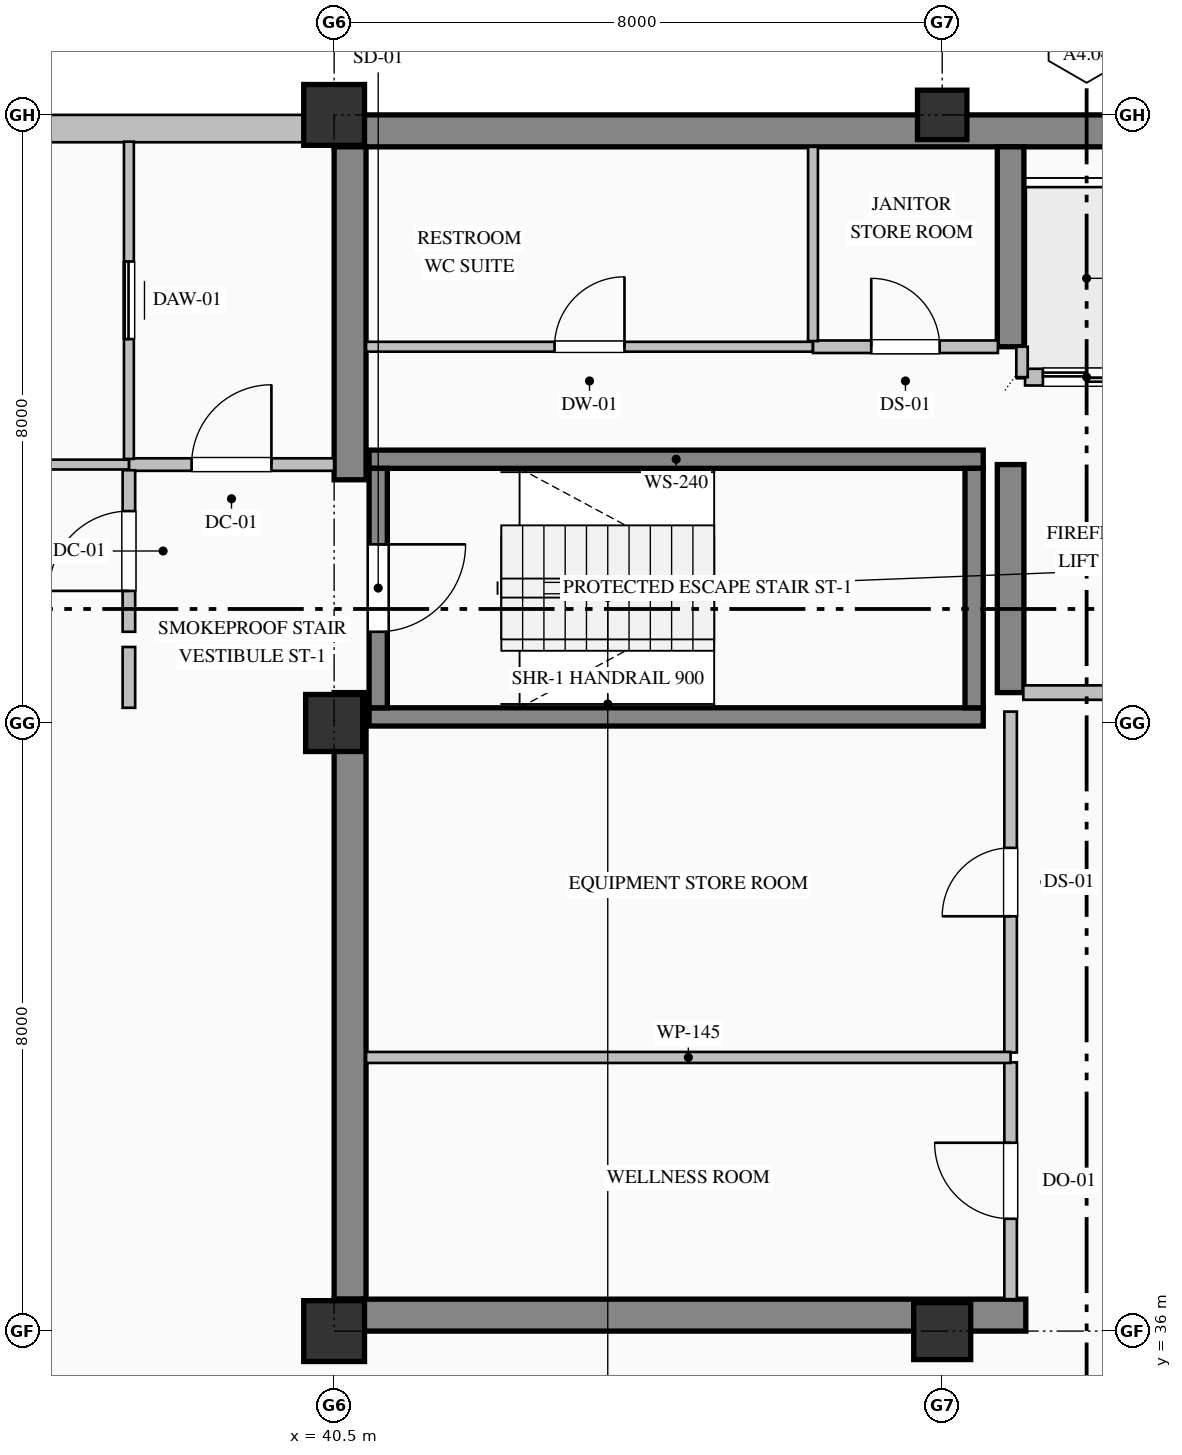
"""IFC4 building model, lengths in metres.
Left out: names, types, materials, properties, quantities, classifications, styles, units other than length and angle.
Written with IfcOpenShell. Run it as: python <this file> out.ifc"""

import sys

from ifc_helpers import new_model, si_unit, direction, frame, frame_2d, origin, origin_2d, place, context, subcontext, project, spatial, rectangle, hollow_rectangle, extrude, element, fill, save


model = new_model("IFC4")
c1 = context("Model", 3, precision=1e-05, world=origin(), true_north=direction((0.0, 1.0)))
c2 = subcontext(c1, "Body", "Model", "MODEL_VIEW")
j1 = project(units=[si_unit("LENGTHUNIT", "METRE"), si_unit("PLANEANGLEUNIT", "RADIAN")], contexts=[c1])
p1 = place(None, origin())
s1 = spatial("IfcSite", under=j1, at=p1, CompositionType="ELEMENT")
p2 = place(p1, origin())
s2 = spatial("IfcBuilding", under=s1, at=p2, CompositionType="ELEMENT")
p3 = place(p2, frame((0.0, 0.0, 307.2)))
s3 = spatial("IfcBuildingStorey", under=s2, at=p3, CompositionType="ELEMENT", Elevation=307.2)
p4 = place(p3, frame((40.5, 51.79, 0.0), z_axis=(0.0, 0.0, 1.0), x_axis=(1.0, 0.0, 0.0)))
e1 = element("IfcWall", 1, at=p4, inside=s3, PredefinedType="SHEAR", context=c2, shape_type="SweptSolid", body=[
    extrude(rectangle(XDim=23.5, YDim=0.42, at=frame_2d((11.75, 0.0))), origin(), (0.0, 0.0, 1.0), 3.785),
])
p5 = place(p3, frame((40.71, 36.42, 0.0), z_axis=(0.0, 0.0, 1.0), x_axis=(0.0, 1.0, 0.0)))
e2 = element("IfcWall", 2, at=p5, inside=s3, PredefinedType="SHEAR", context=c2, shape_type="SweptSolid", body=[
    extrude(rectangle(XDim=7.98, YDim=0.42, at=frame_2d((3.99, 0.0))), origin(), (0.0, 0.0, 1.0), 3.785),
])
p6 = place(p3, frame((40.71, 47.2, 0.0), z_axis=(0.0, 0.0, 1.0), x_axis=(0.0, 1.0, 0.0)))
e3 = element("IfcWall", 3, at=p6, inside=s3, PredefinedType="SHEAR", context=c2, shape_type="SweptSolid", body=[
    extrude(rectangle(XDim=4.38, YDim=0.42, at=frame_2d((2.19, 0.0))), origin(), (0.0, 0.0, 1.0), 3.785),
])
p7 = place(p3, frame((40.5, 36.21, 0.0), z_axis=(0.0, 0.0, 1.0), x_axis=(1.0, 0.0, 0.0)))
e4 = element("IfcWall", 4, at=p7, inside=s3, PredefinedType="SHEAR", context=c2, shape_type="SweptSolid", body=[
    extrude(rectangle(XDim=9.1, YDim=0.42, at=frame_2d((4.55, 0.0))), origin(), (0.0, 0.0, 1.0), 3.785),
])
p8 = place(p3, frame((49.4, 44.4, 0.0), z_axis=(0.0, 0.0, 1.0), x_axis=(0.0, 1.0, 0.0)))
e5 = element("IfcWall", 5, at=p8, inside=s3, PredefinedType="SHEAR", context=c2, shape_type="SweptSolid", body=[
    extrude(rectangle(XDim=3.0, YDim=0.35, at=frame_2d((1.5, 0.0))), origin(), (0.0, 0.0, 1.0), 3.785),
])
p9 = place(p3, frame((49.4, 48.95, 0.0), z_axis=(0.0, 0.0, 1.0), x_axis=(0.0, 1.0, 0.0)))
e6 = element("IfcWall", 6, at=p9, inside=s3, PredefinedType="SHEAR", context=c2, shape_type="SweptSolid", body=[
    extrude(rectangle(XDim=2.63, YDim=0.35, at=frame_2d((1.315, 0.0))), origin(), (0.0, 0.0, 1.0), 3.785),
])
p10 = place(p3, frame((40.5, 36.0, 0.0), z_axis=(0.0, 0.0, 1.0), x_axis=(1.0, 0.0, 0.0)))
e7 = element("IfcColumn", 7, at=p10, inside=s3, PredefinedType="COLUMN", context=c2, shape_type="SweptSolid", body=[
    extrude(hollow_rectangle(XDim=0.8, YDim=0.8, WallThickness=0.032, at=origin_2d()), origin(), (0.0, 0.0, 1.0), 4.0),
])
p11 = place(p3, frame((40.5, 44.0, 0.0), z_axis=(0.0, 0.0, 1.0), x_axis=(1.0, 0.0, 0.0)))
e8 = element("IfcColumn", 8, at=p11, inside=s3, PredefinedType="COLUMN", context=c2, shape_type="SweptSolid", body=[
    extrude(rectangle(XDim=0.75, YDim=0.75, at=origin_2d()), origin(), (0.0, 0.0, 1.0), 4.0),
])
p12 = place(p3, frame((40.5, 52.0, 0.0), z_axis=(0.0, 0.0, 1.0), x_axis=(1.0, 0.0, 0.0)))
e9 = element("IfcColumn", 9, at=p12, inside=s3, PredefinedType="COLUMN", context=c2, shape_type="SweptSolid", body=[
    extrude(hollow_rectangle(XDim=0.8, YDim=0.8, WallThickness=0.032, at=origin_2d()), origin(), (0.0, 0.0, 1.0), 4.0),
])
p13 = place(p3, frame((48.5, 36.0, 0.0), z_axis=(0.0, 0.0, 1.0), x_axis=(1.0, 0.0, 0.0)))
e10 = element("IfcColumn", 10, at=p13, inside=s3, PredefinedType="COLUMN", context=c2, shape_type="SweptSolid", body=[
    extrude(rectangle(XDim=0.75, YDim=0.75, at=origin_2d()), origin(), (0.0, 0.0, 1.0), 4.0),
])
p14 = place(p3, frame((48.5, 52.0, 0.0), z_axis=(0.0, 0.0, 1.0), x_axis=(1.0, 0.0, 0.0)))
e11 = element("IfcColumn", 11, at=p14, inside=s3, PredefinedType="COLUMN", context=c2, shape_type="SweptSolid", body=[
    extrude(hollow_rectangle(XDim=0.65, YDim=0.65, WallThickness=0.028, at=origin_2d()), origin(), (0.0, 0.0, 1.0), 4.0),
])
p15 = place(p3, frame((20.5, 51.82, 0.0), z_axis=(0.0, 0.0, 1.0), x_axis=(1.0, 0.0, 0.0)))
e12 = element("IfcWall", 12, at=p15, inside=s3, PredefinedType="SOLIDWALL", context=c2, shape_type="SweptSolid", body=[
    extrude(rectangle(XDim=20.02, YDim=0.36, at=frame_2d((10.01, 0.0))), origin(), (0.0, 0.0, 1.0), 3.335),
])
p16 = place(p15, frame((6.525, 0.0, 0.9)))
e13 = element("IfcOpeningElement", 13, at=p16, cuts=e12, PredefinedType="OPENING", context=c2, shape_type="SweptSolid", body=[
    extrude(rectangle(XDim=1.35, YDim=1.85, at=frame_2d((0.675, 0.925))), frame((0.0, 0.19, 0.0), z_axis=(0.0, -1.0, 0.0), x_axis=(1.0, 0.0, 0.0)), (0.0, 0.0, 1.0), 0.38),
])
for number, where, z_axis, x_axis in (
    (14, (40.96, 47.47, 0.0), (0.0, 0.0, 1.0), (1.0, 0.0, 0.0)),
    (15, (49.04, 44.08, 0.0), (0.0, 0.0, 1.0), (-1.0, 0.0, 0.0)),
):
    element("IfcWall", number, at=place(p3, frame(where, z_axis=z_axis, x_axis=x_axis)), inside=s3, PredefinedType="SOLIDWALL", context=c2, shape_type="SweptSolid", body=[
        extrude(rectangle(XDim=8.08, YDim=0.24, at=frame_2d((4.04, 0.0))), origin(), (0.0, 0.0, 1.0), 4.0),
    ])
p17 = place(p3, frame((41.08, 47.35, 0.0), z_axis=(0.0, 0.0, 1.0), x_axis=(0.0, -1.0, 0.0)))
e16 = element("IfcWall", 16, at=p17, inside=s3, PredefinedType="SOLIDWALL", context=c2, shape_type="SweptSolid", body=[
    extrude(rectangle(XDim=3.15, YDim=0.24, at=frame_2d((1.575, 0.0))), origin(), (0.0, 0.0, 1.0), 4.0),
])
p18 = place(p17, frame((1.0, 0.0, 0.0)))
e17 = element("IfcOpeningElement", 17, at=p18, cuts=e16, PredefinedType="OPENING", context=c2, shape_type="SweptSolid", body=[
    extrude(rectangle(XDim=1.15, YDim=2.2, at=frame_2d((0.575, 1.1))), frame((0.0, 0.13, 0.0), z_axis=(0.0, -1.0, 0.0), x_axis=(1.0, 0.0, 0.0)), (0.0, 0.0, 1.0), 0.26),
])
p19 = place(p3, frame((48.92, 44.2, 0.0), z_axis=(0.0, 0.0, 1.0), x_axis=(0.0, 1.0, 0.0)))
e18 = element("IfcWall", 18, at=p19, inside=s3, PredefinedType="SOLIDWALL", context=c2, shape_type="SweptSolid", body=[
    extrude(rectangle(XDim=3.15, YDim=0.24, at=frame_2d((1.575, 0.0))), origin(), (0.0, 0.0, 1.0), 4.0),
])
p20 = place(p3, frame((54.71, 48.55, 0.0), z_axis=(0.0, 0.0, 1.0), x_axis=(-1.0, 0.0, 0.0)))
e19 = element("IfcWall", 19, at=p20, inside=s3, PredefinedType="PARTITIONING", context=c2, shape_type="SweptSolid", body=[
    extrude(rectangle(XDim=5.12, YDim=0.22, at=frame_2d((2.56, 0.0))), origin(), (0.0, 0.0, 1.0), 3.785),
])
p21 = place(p20, frame((3.735, 0.0, 0.0)))
e20 = element("IfcOpeningElement", 20, at=p21, cuts=e19, PredefinedType="OPENING", context=c2, shape_type="SweptSolid", body=[
    extrude(rectangle(XDim=1.15, YDim=2.2, at=frame_2d((0.575, 1.1))), frame((0.0, 0.12, 0.0), z_axis=(0.0, -1.0, 0.0), x_axis=(1.0, 0.0, 0.0)), (0.0, 0.0, 1.0), 0.24),
])
p22 = place(p20, frame((0.935, 0.0, 0.0)))
e21 = element("IfcOpeningElement", 21, at=p22, cuts=e19, PredefinedType="OPENING", context=c2, shape_type="SweptSolid", body=[
    extrude(rectangle(XDim=1.15, YDim=2.2, at=frame_2d((0.575, 1.1))), frame((0.0, 0.12, 0.0), z_axis=(0.0, -1.0, 0.0), x_axis=(1.0, 0.0, 0.0)), (0.0, 0.0, 1.0), 0.24),
])
p23 = place(p3, frame((49.55, 48.55, 0.0), z_axis=(0.0, 0.0, 1.0), x_axis=(0.0, 1.0, 0.0)))
e22 = element("IfcWall", 22, at=p23, inside=s3, PredefinedType="PARTITIONING", context=c2, shape_type="SweptSolid", body=[
    extrude(rectangle(XDim=0.4, YDim=0.15, at=frame_2d((0.2, 0.0))), origin(), (0.0, 0.0, 1.0), 3.785),
])
p24 = place(p3, frame((37.8, 47.4, 0.0), z_axis=(0.0, 0.0, 1.0), x_axis=(1.0, 0.0, 0.0)))
e23 = element("IfcWall", 23, at=p24, inside=s3, PredefinedType="PARTITIONING", context=c2, shape_type="SweptSolid", body=[
    extrude(rectangle(XDim=2.7, YDim=0.165, at=frame_2d((1.35, 0.0))), origin(), (0.0, 0.0, 1.0), 3.785),
])
p25 = place(p24, frame((0.825, 0.0, 0.0)))
e24 = element("IfcOpeningElement", 24, at=p25, cuts=e23, PredefinedType="OPENING", context=c2, shape_type="SweptSolid", body=[
    extrude(rectangle(XDim=1.05, YDim=2.15, at=frame_2d((0.525, 1.075))), frame((0.0, 0.093, 0.0), z_axis=(0.0, -1.0, 0.0), x_axis=(1.0, 0.0, 0.0)), (0.0, 0.0, 1.0), 0.185),
])
p26 = place(p3, frame((37.8, 45.2, 0.0), z_axis=(0.0, 0.0, 1.0), x_axis=(0.0, 1.0, 0.0)))
e25 = element("IfcWall", 25, at=p26, inside=s3, PredefinedType="PARTITIONING", context=c2, shape_type="SweptSolid", body=[
    extrude(rectangle(XDim=2.125, YDim=0.165, at=frame_2d((1.063, 0.0))), origin(), (0.0, 0.0, 1.0), 3.785),
])
p27 = place(p26, frame((0.538, 0.0, 0.0)))
e26 = element("IfcOpeningElement", 26, at=p27, cuts=e25, PredefinedType="OPENING", context=c2, shape_type="SweptSolid", body=[
    extrude(rectangle(XDim=1.05, YDim=2.15, at=frame_2d((0.525, 1.075))), frame((0.0, 0.093, 0.0), z_axis=(0.0, -1.0, 0.0), x_axis=(1.0, 0.0, 0.0)), (0.0, 0.0, 1.0), 0.185),
])
p28 = place(p3, frame((37.8, 44.2, 0.0), z_axis=(0.0, 0.0, 1.0), x_axis=(0.0, 1.0, 0.0)))
e27 = element("IfcWall", 27, at=p28, inside=s3, PredefinedType="PARTITIONING", context=c2, shape_type="SweptSolid", body=[
    extrude(rectangle(XDim=0.8, YDim=0.165, at=frame_2d((0.4, 0.0))), origin(), (0.0, 0.0, 1.0), 3.785),
])
p29 = place(p3, frame((37.8, 47.475, 0.0), z_axis=(0.0, 0.0, 1.0), x_axis=(0.0, 1.0, 0.0)))
e28 = element("IfcWall", 28, at=p29, inside=s3, PredefinedType="PARTITIONING", context=c2, shape_type="SweptSolid", body=[
    extrude(rectangle(XDim=4.173, YDim=0.13, at=frame_2d((2.087, 0.0))), origin(), (0.0, 0.0, 1.0), 3.785),
])
p30 = place(p29, frame((1.577, 0.0, 0.0)))
e29 = element("IfcOpeningElement", 29, at=p30, cuts=e28, PredefinedType="OPENING", context=c2, shape_type="SweptSolid", body=[
    extrude(rectangle(XDim=1.02, YDim=2.15, at=frame_2d((0.51, 1.075))), frame((0.0, 0.075, 0.0), z_axis=(0.0, -1.0, 0.0), x_axis=(1.0, 0.0, 0.0)), (0.0, 0.0, 1.0), 0.15),
])
p31 = place(p3, frame((37.8, 47.4, 0.0), z_axis=(0.0, 0.0, 1.0), x_axis=(-1.0, 0.0, 0.0)))
e30 = element("IfcWall", 30, at=p31, inside=s3, PredefinedType="PARTITIONING", context=c2, shape_type="SweptSolid", body=[
    extrude(rectangle(XDim=2.4, YDim=0.13, at=frame_2d((1.2, 0.0))), origin(), (0.0, 0.0, 1.0), 3.785),
])
p32 = place(p3, frame((40.92, 48.95, 0.0), z_axis=(0.0, 0.0, 1.0), x_axis=(1.0, 0.0, 0.0)))
e31 = element("IfcWall", 31, at=p32, inside=s3, PredefinedType="PARTITIONING", context=c2, shape_type="SweptSolid", body=[
    extrude(rectangle(XDim=5.88, YDim=0.13, at=frame_2d((2.94, 0.0))), origin(), (0.0, 0.0, 1.0), 3.785),
])
p33 = place(p32, frame((2.48, 0.0, 0.0)))
e32 = element("IfcOpeningElement", 32, at=p33, cuts=e31, PredefinedType="OPENING", context=c2, shape_type="SweptSolid", body=[
    extrude(rectangle(XDim=0.92, YDim=2.15, at=frame_2d((0.46, 1.075))), frame((0.0, 0.075, 0.0), z_axis=(0.0, -1.0, 0.0), x_axis=(1.0, 0.0, 0.0)), (0.0, 0.0, 1.0), 0.15),
])
p34 = place(p3, frame((46.8, 48.95, 0.0), z_axis=(0.0, 0.0, 1.0), x_axis=(1.0, 0.0, 0.0)))
e33 = element("IfcWall", 33, at=p34, inside=s3, PredefinedType="PARTITIONING", context=c2, shape_type="SweptSolid", body=[
    extrude(rectangle(XDim=2.433, YDim=0.165, at=frame_2d((1.216, 0.0))), origin(), (0.0, 0.0, 1.0), 3.785),
])
p35 = place(p34, frame((0.767, 0.0, 0.0)))
e34 = element("IfcOpeningElement", 34, at=p35, cuts=e33, PredefinedType="OPENING", context=c2, shape_type="SweptSolid", body=[
    extrude(rectangle(XDim=0.9, YDim=2.15, at=frame_2d((0.45, 1.075))), frame((0.0, 0.093, 0.0), z_axis=(0.0, -1.0, 0.0), x_axis=(1.0, 0.0, 0.0)), (0.0, 0.0, 1.0), 0.185),
])
p36 = place(p3, frame((54.733, 44.4, 0.0), z_axis=(0.0, 0.0, 1.0), x_axis=(-1.0, 0.0, 0.0)))
e35 = element("IfcWall", 35, at=p36, inside=s3, PredefinedType="PARTITIONING", context=c2, shape_type="SweptSolid", body=[
    extrude(rectangle(XDim=5.166, YDim=0.19, at=frame_2d((2.583, 0.0))), origin(), (0.0, 0.0, 1.0), 3.785),
])
p37 = place(p36, frame((2.058, 0.0, 0.0)))
e36 = element("IfcOpeningElement", 36, at=p37, cuts=e35, PredefinedType="OPENING", context=c2, shape_type="SweptSolid", body=[
    extrude(rectangle(XDim=1.05, YDim=2.15, at=frame_2d((0.525, 1.075))), frame((0.0, 0.105, 0.0), z_axis=(0.0, -1.0, 0.0), x_axis=(1.0, 0.0, 0.0)), (0.0, 0.0, 1.0), 0.21),
])
p38 = place(p3, frame((49.4, 36.42, 0.0), z_axis=(0.0, 0.0, 1.0), x_axis=(0.0, 1.0, 0.0)))
e37 = element("IfcWall", 37, at=p38, inside=s3, PredefinedType="PARTITIONING", context=c2, shape_type="SweptSolid", body=[
    extrude(rectangle(XDim=3.115, YDim=0.165, at=frame_2d((1.558, 0.0))), origin(), (0.0, 0.0, 1.0), 3.027),
])
p39 = place(p38, frame((1.058, 0.0, 0.0)))
e38 = element("IfcOpeningElement", 38, at=p39, cuts=e37, PredefinedType="OPENING", context=c2, shape_type="SweptSolid", body=[
    extrude(rectangle(XDim=1.0, YDim=2.15, at=frame_2d((0.5, 1.075))), frame((0.0, 0.093, 0.0), z_axis=(0.0, -1.0, 0.0), x_axis=(1.0, 0.0, 0.0)), (0.0, 0.0, 1.0), 0.185),
])
p40 = place(p3, frame((49.4, 39.665, 0.0), z_axis=(0.0, 0.0, 1.0), x_axis=(0.0, 1.0, 0.0)))
e39 = element("IfcWall", 39, at=p40, inside=s3, PredefinedType="PARTITIONING", context=c2, shape_type="SweptSolid", body=[
    extrude(rectangle(XDim=4.485, YDim=0.165, at=frame_2d((2.243, 0.0))), origin(), (0.0, 0.0, 1.0), 3.027),
])
p41 = place(p40, frame((1.793, 0.0, 0.0)))
e40 = element("IfcOpeningElement", 40, at=p41, cuts=e39, PredefinedType="OPENING", context=c2, shape_type="SweptSolid", body=[
    extrude(rectangle(XDim=0.9, YDim=2.15, at=frame_2d((0.45, 1.075))), frame((0.0, 0.093, 0.0), z_axis=(0.0, -1.0, 0.0), x_axis=(1.0, 0.0, 0.0)), (0.0, 0.0, 1.0), 0.185),
])
p42 = place(p3, frame((40.92, 39.6, 0.0), z_axis=(0.0, 0.0, 1.0), x_axis=(1.0, 0.0, 0.0)))
e41 = element("IfcWall", 41, at=p42, inside=s3, PredefinedType="PARTITIONING", context=c2, shape_type="SweptSolid", body=[
    extrude(rectangle(XDim=8.48, YDim=0.145, at=frame_2d((4.24, 0.0))), origin(), (0.0, 0.0, 1.0), 3.785),
])
p43 = place(p3, frame((46.8, 51.58, 0.0), z_axis=(0.0, 0.0, 1.0), x_axis=(0.0, -1.0, 0.0)))
e42 = element("IfcWall", 42, at=p43, inside=s3, PredefinedType="PARTITIONING", context=c2, shape_type="SweptSolid", body=[
    extrude(rectangle(XDim=2.556, YDim=0.13, at=frame_2d((1.278, 0.0))), origin(), (0.0, 0.0, 1.0), 3.785),
])
p44 = place(p18, origin())
e43 = element("IfcDoor", 43, at=p44, inside=s3, OperationType="SINGLE_SWING_LEFT", PredefinedType="DOOR", context=c2, shape_type="SweptSolid", body=[
    extrude(rectangle(XDim=1.15, YDim=2.2, at=frame_2d((0.575, 1.1))), frame((0.0, 0.025, 0.0), z_axis=(0.0, -1.0, 0.0), x_axis=(1.0, 0.0, 0.0)), (0.0, 0.0, 1.0), 0.05),
])
fill(e17, e43)
p45 = place(p21, origin())
e44 = element("IfcDoor", 44, at=p45, inside=s3, OperationType="DOUBLE_DOOR_SLIDING", PredefinedType="DOOR", context=c2, shape_type="SweptSolid", body=[
    extrude(rectangle(XDim=1.15, YDim=2.2, at=frame_2d((0.575, 1.1))), frame((0.0, 0.025, 0.0), z_axis=(0.0, -1.0, 0.0), x_axis=(1.0, 0.0, 0.0)), (0.0, 0.0, 1.0), 0.05),
])
fill(e20, e44)
p46 = place(p25, origin())
e45 = element("IfcDoor", 45, at=p46, inside=s3, OperationType="SINGLE_SWING_RIGHT", PredefinedType="DOOR", context=c2, shape_type="SweptSolid", body=[
    extrude(rectangle(XDim=1.05, YDim=2.15, at=frame_2d((0.525, 1.075))), frame((0.0, 0.025, 0.0), z_axis=(0.0, -1.0, 0.0), x_axis=(1.0, 0.0, 0.0)), (0.0, 0.0, 1.0), 0.05),
])
fill(e24, e45)
p47 = place(p27, origin())
e46 = element("IfcDoor", 46, at=p47, inside=s3, OperationType="SINGLE_SWING_LEFT", PredefinedType="DOOR", context=c2, shape_type="SweptSolid", body=[
    extrude(rectangle(XDim=1.05, YDim=2.15, at=frame_2d((0.525, 1.075))), frame((0.0, 0.025, 0.0), z_axis=(0.0, -1.0, 0.0), x_axis=(1.0, 0.0, 0.0)), (0.0, 0.0, 1.0), 0.05),
])
fill(e26, e46)
p48 = place(p30, origin())
e47 = element("IfcDoor", 47, at=p48, inside=s3, OperationType="SLIDING_TO_LEFT", PredefinedType="DOOR", context=c2, shape_type="SweptSolid", body=[
    extrude(rectangle(XDim=1.02, YDim=2.15, at=frame_2d((0.51, 1.075))), frame((0.0, 0.025, 0.0), z_axis=(0.0, -1.0, 0.0), x_axis=(1.0, 0.0, 0.0)), (0.0, 0.0, 1.0), 0.05),
])
fill(e29, e47)
p49 = place(p39, origin())
e48 = element("IfcDoor", 48, at=p49, inside=s3, OperationType="SINGLE_SWING_RIGHT", PredefinedType="DOOR", context=c2, shape_type="SweptSolid", body=[
    extrude(rectangle(XDim=1.0, YDim=2.15, at=frame_2d((0.5, 1.075))), frame((0.0, 0.025, 0.0), z_axis=(0.0, -1.0, 0.0), x_axis=(1.0, 0.0, 0.0)), (0.0, 0.0, 1.0), 0.05),
])
fill(e38, e48)
p50 = place(p41, origin())
e49 = element("IfcDoor", 49, at=p50, inside=s3, OperationType="SINGLE_SWING_LEFT", PredefinedType="DOOR", context=c2, shape_type="SweptSolid", body=[
    extrude(rectangle(XDim=0.9, YDim=2.15, at=frame_2d((0.45, 1.075))), frame((0.0, 0.025, 0.0), z_axis=(0.0, -1.0, 0.0), x_axis=(1.0, 0.0, 0.0)), (0.0, 0.0, 1.0), 0.05),
])
fill(e40, e49)
p51 = place(p33, origin())
e50 = element("IfcDoor", 50, at=p51, inside=s3, OperationType="SINGLE_SWING_RIGHT", PredefinedType="DOOR", context=c2, shape_type="SweptSolid", body=[
    extrude(rectangle(XDim=0.92, YDim=2.15, at=frame_2d((0.46, 1.075))), frame((0.0, 0.025, 0.0), z_axis=(0.0, -1.0, 0.0), x_axis=(1.0, 0.0, 0.0)), (0.0, 0.0, 1.0), 0.05),
])
fill(e32, e50)
p52 = place(p35, origin())
e51 = element("IfcDoor", 51, at=p52, inside=s3, OperationType="SINGLE_SWING_LEFT", PredefinedType="DOOR", context=c2, shape_type="SweptSolid", body=[
    extrude(rectangle(XDim=0.9, YDim=2.15, at=frame_2d((0.45, 1.075))), frame((0.0, 0.025, 0.0), z_axis=(0.0, -1.0, 0.0), x_axis=(1.0, 0.0, 0.0)), (0.0, 0.0, 1.0), 0.05),
])
fill(e34, e51)
save(model, sys.argv[1])
